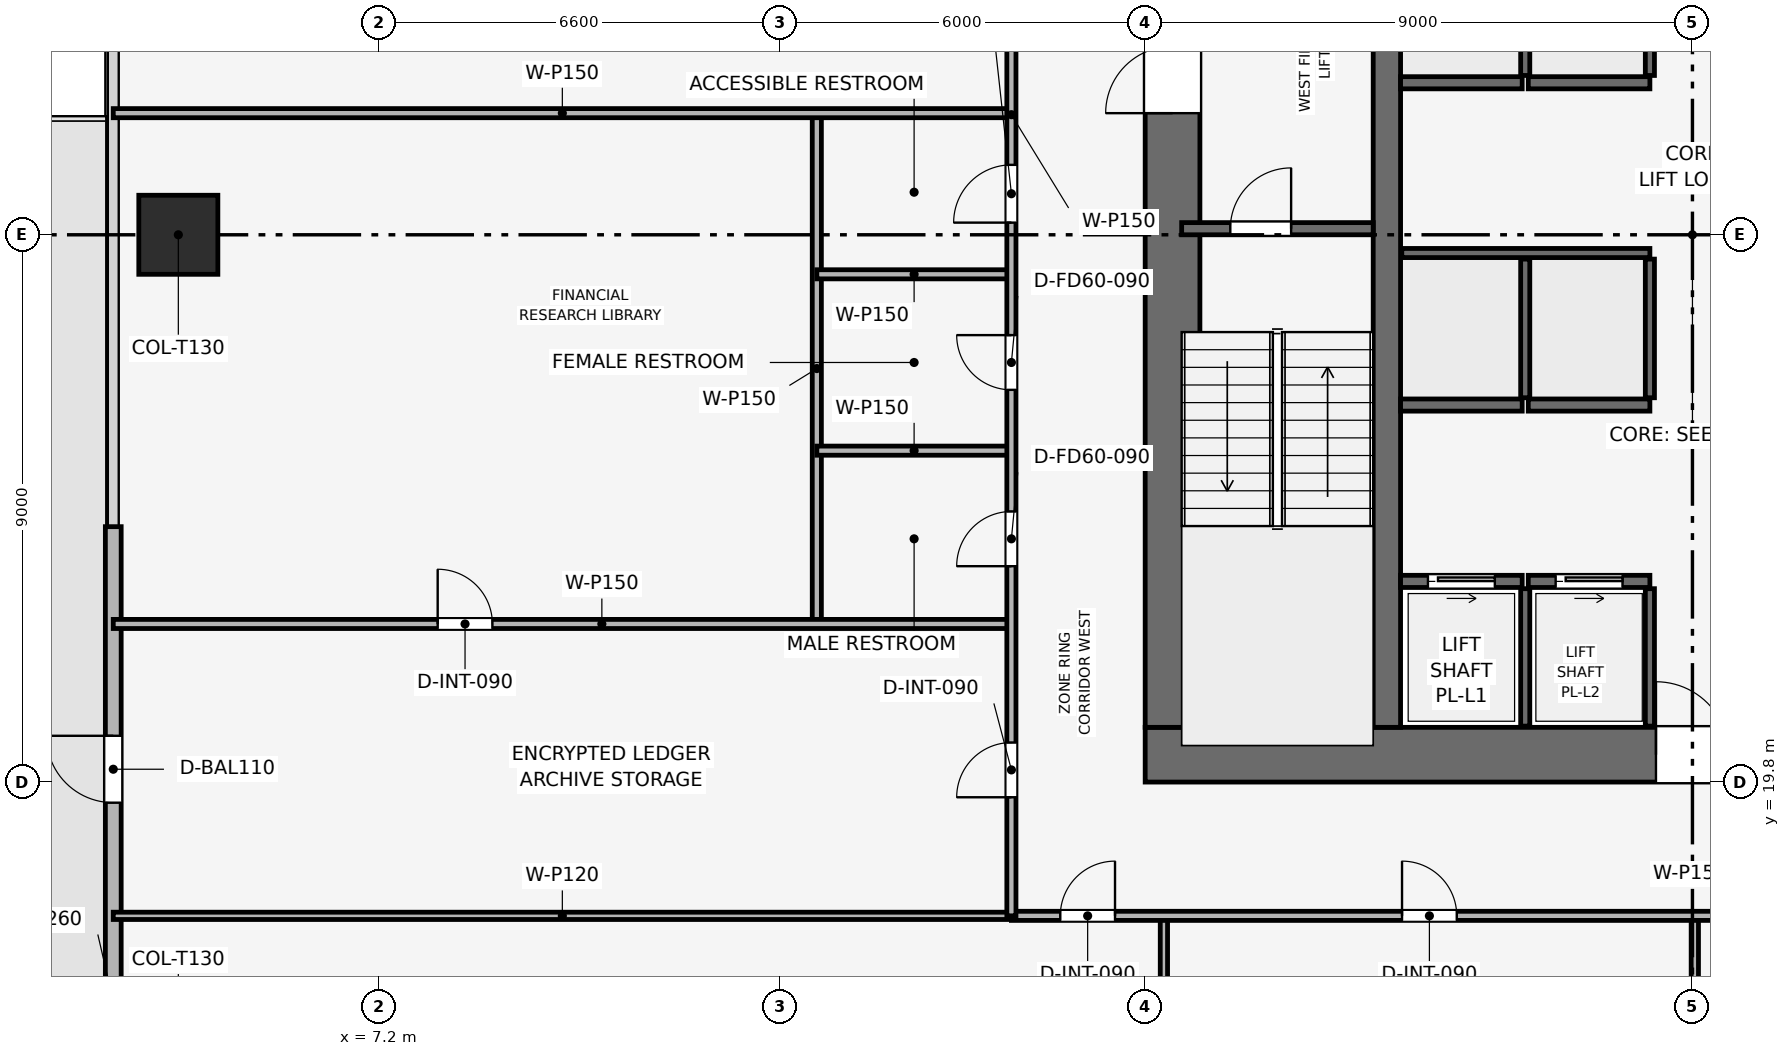
"""IFC4 building model, lengths in metres.
Left out: names, types, materials, properties, quantities, classifications, styles, units other than length and angle.
Written with IfcOpenShell. Run it as: python <this file> out.ifc"""

import sys

from ifc_helpers import new_model, si_unit, direction, frame, frame_2d, origin, origin_2d, place, context, subcontext, project, spatial, rectangle, extrude, element, fill, save


model = new_model("IFC4")
c1 = context("Model", 3, precision=1e-05, world=origin(), true_north=direction((0.0, 1.0)))
c2 = subcontext(c1, "Body", "Model", "MODEL_VIEW")
j1 = project(units=[si_unit("LENGTHUNIT", "METRE"), si_unit("PLANEANGLEUNIT", "RADIAN")], contexts=[c1])
p1 = place(None, origin())
s1 = spatial("IfcSite", under=j1, at=p1, CompositionType="ELEMENT")
p2 = place(p1, origin())
s2 = spatial("IfcBuilding", under=s1, at=p2, CompositionType="ELEMENT")
p3 = place(p2, frame((0.0, 0.0, 121.2)))
s3 = spatial("IfcBuildingStorey", under=s2, at=p3, CompositionType="ELEMENT", Elevation=121.2)
p4 = place(p3, frame((19.8, 20.25, 0.0), z_axis=(0.0, 0.0, 1.0), x_axis=(1.0, 0.0, 0.0)))
e1 = element("IfcWall", 1, at=p4, inside=s3, PredefinedType="SHEAR", context=c2, shape_type="SweptSolid", body=[
    extrude(rectangle(XDim=18.0, YDim=0.9, at=frame_2d((9.0, 0.0))), origin(), (0.0, 0.0, 1.0), 3.9),
])
p5 = place(p4, frame((8.4, 0.0, 0.0)))
e2 = element("IfcOpeningElement", 2, at=p5, cuts=e1, PredefinedType="OPENING", context=c2, shape_type="SweptSolid", body=[
    extrude(rectangle(XDim=1.2, YDim=2.2, at=frame_2d((0.6, 1.1))), frame((0.0, 0.46, 0.0), z_axis=(0.0, -1.0, 0.0), x_axis=(1.0, 0.0, 0.0)), (0.0, 0.0, 1.0), 0.92),
])
p6 = place(p3, frame((20.25, 20.7, 0.0), z_axis=(0.0, 0.0, 1.0), x_axis=(0.0, 1.0, 0.0)))
e3 = element("IfcWall", 3, at=p6, inside=s3, PredefinedType="SHEAR", context=c2, shape_type="SweptSolid", body=[
    extrude(rectangle(XDim=16.2, YDim=0.9, at=frame_2d((8.1, 0.0))), origin(), (0.0, 0.0, 1.0), 3.9),
])
p7 = place(p6, frame((10.1, 0.0, 0.0)))
e4 = element("IfcOpeningElement", 4, at=p7, cuts=e3, PredefinedType="OPENING", context=c2, shape_type="SweptSolid", body=[
    extrude(rectangle(XDim=1.1, YDim=2.15, at=frame_2d((0.55, 1.075))), frame((0.0, 0.46, 0.0), z_axis=(0.0, -1.0, 0.0), x_axis=(1.0, 0.0, 0.0)), (0.0, 0.0, 1.0), 0.92),
])
p8 = place(p3, frame((23.775, 20.7, 0.0), z_axis=(0.0, 0.0, 1.0), x_axis=(0.0, 1.0, 0.0)))
e5 = element("IfcWall", 5, at=p8, inside=s3, PredefinedType="SHEAR", context=c2, shape_type="SweptSolid", body=[
    extrude(rectangle(XDim=16.2, YDim=0.45, at=frame_2d((8.1, 0.0))), origin(), (0.0, 0.0, 1.0), 3.9),
])
p9 = place(p3, frame((3.9, 28.8, 0.003), z_axis=(0.0, 0.0, 1.0), x_axis=(1.0, 0.0, 0.0)))
e6 = element("IfcColumn", 6, at=p9, inside=s3, PredefinedType="COLUMN", context=c2, shape_type="SweptSolid", body=[
    extrude(rectangle(XDim=1.3, YDim=1.3, at=origin_2d()), origin(), (0.0, 0.0, 1.0), 3.644),
])
p10 = place(p3, frame((2.83, 9.9, 0.0), z_axis=(0.0, 0.0, 1.0), x_axis=(0.0, 1.0, 0.0)))
e7 = element("IfcWall", 7, at=p10, inside=s3, PredefinedType="SOLIDWALL", context=c2, shape_type="SweptSolid", body=[
    extrude(rectangle(XDim=14.1, YDim=0.26, at=frame_2d((7.05, 0.0))), origin(), (0.0, 0.0, 1.0), 3.65),
])
p11 = place(p10, frame((9.561, 0.0, 0.0)))
e8 = element("IfcOpeningElement", 8, at=p11, cuts=e7, PredefinedType="OPENING", context=c2, shape_type="SweptSolid", body=[
    extrude(rectangle(XDim=1.1, YDim=2.2, at=frame_2d((0.55, 1.1))), frame((0.0, 0.14, 0.0), z_axis=(0.0, -1.0, 0.0), x_axis=(1.0, 0.0, 0.0)), (0.0, 0.0, 1.0), 0.28),
])
p12 = place(p3, frame((20.4, 28.9, 0.0), z_axis=(0.0, 0.0, 1.0), x_axis=(1.0, 0.0, 0.0)))
e9 = element("IfcWall", 9, at=p12, inside=s3, PredefinedType="SHEAR", context=c2, shape_type="SweptSolid", body=[
    extrude(rectangle(XDim=3.15, YDim=0.2, at=frame_2d((1.575, 0.0))), origin(), (0.0, 0.0, 1.0), 3.65),
])
p13 = place(p12, frame((0.8, 0.0, 0.0)))
e10 = element("IfcOpeningElement", 10, at=p13, cuts=e9, PredefinedType="OPENING", context=c2, shape_type="SweptSolid", body=[
    extrude(rectangle(XDim=1.0, YDim=2.1, at=frame_2d((0.5, 1.05))), frame((0.0, 0.11, 0.0), z_axis=(0.0, -1.0, 0.0), x_axis=(1.0, 0.0, 0.0)), (0.0, 0.0, 1.0), 0.22),
])
p14 = place(p3, frame((24.0, 23.1, 0.0), z_axis=(0.0, 0.0, 1.0), x_axis=(1.0, 0.0, 0.0)))
e11 = element("IfcWall", 11, at=p14, inside=s3, PredefinedType="SHEAR", context=c2, shape_type="SweptSolid", body=[
    extrude(rectangle(XDim=2.0, YDim=0.2, at=frame_2d((1.0, 0.0))), origin(), (0.0, 0.0, 1.0), 3.65),
])
p15 = place(p14, frame((0.45, 0.0, 0.0)))
e12 = element("IfcOpeningElement", 12, at=p15, cuts=e11, PredefinedType="OPENING", context=c2, shape_type="SweptSolid", body=[
    extrude(rectangle(XDim=1.1, YDim=2.15, at=frame_2d((0.55, 1.075))), frame((0.0, 0.11, 0.0), z_axis=(0.0, -1.0, 0.0), x_axis=(1.0, 0.0, 0.0)), (0.0, 0.0, 1.0), 0.22),
])
p16 = place(p3, frame((26.1, 23.1, 0.0), z_axis=(0.0, 0.0, 1.0), x_axis=(1.0, 0.0, 0.0)))
e13 = element("IfcWall", 13, at=p16, inside=s3, PredefinedType="SHEAR", context=c2, shape_type="SweptSolid", body=[
    extrude(rectangle(XDim=2.0, YDim=0.2, at=frame_2d((1.0, 0.0))), origin(), (0.0, 0.0, 1.0), 3.65),
])
p17 = place(p16, frame((0.45, 0.0, 0.0)))
e14 = element("IfcOpeningElement", 14, at=p17, cuts=e13, PredefinedType="OPENING", context=c2, shape_type="SweptSolid", body=[
    extrude(rectangle(XDim=1.1, YDim=2.15, at=frame_2d((0.55, 1.075))), frame((0.0, 0.11, 0.0), z_axis=(0.0, -1.0, 0.0), x_axis=(1.0, 0.0, 0.0)), (0.0, 0.0, 1.0), 0.22),
])
for number, where, z_axis, x_axis in (
    (15, (24.0, 26.0, 0.0), (0.0, 0.0, 1.0), (1.0, 0.0, 0.0)),
    (16, (26.1, 26.0, 0.0), (0.0, 0.0, 1.0), (1.0, 0.0, 0.0)),
    (17, (24.0, 31.3, 0.0), (0.0, 0.0, 1.0), (1.0, 0.0, 0.0)),
    (18, (26.1, 31.3, 0.0), (0.0, 0.0, 1.0), (1.0, 0.0, 0.0)),
):
    element("IfcWall", number, at=place(p3, frame(where, z_axis=z_axis, x_axis=x_axis)), inside=s3, PredefinedType="SHEAR", context=c2, shape_type="SweptSolid", body=[
        extrude(rectangle(XDim=2.0, YDim=0.2, at=frame_2d((1.0, 0.0))), origin(), (0.0, 0.0, 1.0), 3.65),
    ])
for number, where, z_axis, x_axis in (
    (19, (26.05, 20.72, 0.0), (0.0, 0.0, 1.0), (0.0, 1.0, 0.0)),
    (20, (28.1, 20.72, 0.0), (0.0, 0.0, 1.0), (0.0, 1.0, 0.0)),
):
    element("IfcWall", number, at=place(p3, frame(where, z_axis=z_axis, x_axis=x_axis)), inside=s3, PredefinedType="SHEAR", context=c2, shape_type="SweptSolid", body=[
        extrude(rectangle(XDim=2.26, YDim=0.15, at=frame_2d((1.13, 0.0))), origin(), (0.0, 0.0, 1.0), 3.65),
    ])
p18 = place(p3, frame((24.02, 28.5, 0.0), z_axis=(0.0, 0.0, 1.0), x_axis=(1.0, 0.0, 0.0)))
e21 = element("IfcWall", 21, at=p18, inside=s3, PredefinedType="SHEAR", context=c2, shape_type="SweptSolid", body=[
    extrude(rectangle(XDim=4.08, YDim=0.15, at=frame_2d((2.04, 0.0))), origin(), (0.0, 0.0, 1.0), 3.65),
])
for number, where, z_axis, x_axis in (
    (22, (26.05, 26.12, 0.0), (0.0, 0.0, 1.0), (0.0, 1.0, 0.0)),
    (23, (28.1, 26.12, 0.0), (0.0, 0.0, 1.0), (0.0, 1.0, 0.0)),
):
    element("IfcWall", number, at=place(p3, frame(where, z_axis=z_axis, x_axis=x_axis)), inside=s3, PredefinedType="SHEAR", context=c2, shape_type="SweptSolid", body=[
        extrude(rectangle(XDim=2.28, YDim=0.15, at=frame_2d((1.14, 0.0))), origin(), (0.0, 0.0, 1.0), 3.65),
    ])
for number, where, z_axis, x_axis in (
    (24, (26.05, 31.42, 0.0), (0.0, 0.0, 1.0), (0.0, 1.0, 0.0)),
    (25, (28.1, 31.42, 0.0), (0.0, 0.0, 1.0), (0.0, 1.0, 0.0)),
):
    element("IfcWall", number, at=place(p3, frame(where, z_axis=z_axis, x_axis=x_axis)), inside=s3, PredefinedType="SHEAR", context=c2, shape_type="SweptSolid", body=[
        extrude(rectangle(XDim=2.24, YDim=0.15, at=frame_2d((1.12, 0.0))), origin(), (0.0, 0.0, 1.0), 3.65),
    ])
p19 = place(p3, frame((20.108, 2.83, 0.0), z_axis=(0.0, 0.0, 1.0), x_axis=(0.0, 1.0, 0.0)))
e26 = element("IfcWall", 26, at=p19, inside=s3, PredefinedType="PARTITIONING", context=c2, shape_type="SweptSolid", body=[
    extrude(rectangle(XDim=14.77, YDim=0.12, at=frame_2d((7.385, 0.0))), origin(), (0.0, 0.0, 1.0), 3.035),
])
p20 = place(p3, frame((28.839, 2.83, 0.0), z_axis=(0.0, 0.0, 1.0), x_axis=(0.0, 1.0, 0.0)))
e27 = element("IfcWall", 27, at=p20, inside=s3, PredefinedType="PARTITIONING", context=c2, shape_type="SweptSolid", body=[
    extrude(rectangle(XDim=14.77, YDim=0.12, at=frame_2d((7.385, 0.0))), origin(), (0.0, 0.0, 1.0), 3.135),
])
p21 = place(p3, frame((2.83, 17.6, 0.0), z_axis=(0.0, 0.0, 1.0), x_axis=(1.0, 0.0, 0.0)))
e28 = element("IfcWall", 28, at=p21, inside=s3, PredefinedType="PARTITIONING", context=c2, shape_type="SweptSolid", body=[
    extrude(rectangle(XDim=14.77, YDim=0.12, at=frame_2d((7.385, 0.0))), origin(), (0.0, 0.0, 1.0), 3.035),
])
p22 = place(p3, frame((14.4, 22.4, 0.0), z_axis=(0.0, 0.0, 1.0), x_axis=(0.0, 1.0, 0.0)))
e29 = element("IfcWall", 29, at=p22, inside=s3, PredefinedType="PARTITIONING", context=c2, shape_type="SweptSolid", body=[
    extrude(rectangle(XDim=8.4, YDim=0.15, at=frame_2d((4.2, 0.0))), origin(), (0.0, 0.0, 1.0), 3.185),
])
p23 = place(p3, frame((2.83, 22.4, 0.0), z_axis=(0.0, 0.0, 1.0), x_axis=(1.0, 0.0, 0.0)))
e30 = element("IfcWall", 30, at=p23, inside=s3, PredefinedType="PARTITIONING", context=c2, shape_type="SweptSolid", body=[
    extrude(rectangle(XDim=14.77, YDim=0.15, at=frame_2d((7.385, 0.0))), origin(), (0.0, 0.0, 1.0), 3.035),
])
p24 = place(p23, frame((5.335, 0.0, 0.0)))
e31 = element("IfcOpeningElement", 31, at=p24, cuts=e30, PredefinedType="OPENING", context=c2, shape_type="SweptSolid", body=[
    extrude(rectangle(XDim=0.9, YDim=2.1, at=frame_2d((0.45, 1.05))), frame((0.0, 0.085, 0.0), z_axis=(0.0, -1.0, 0.0), x_axis=(1.0, 0.0, 0.0)), (0.0, 0.0, 1.0), 0.17),
])
p25 = place(p3, frame((2.83, 30.8, 0.0), z_axis=(0.0, 0.0, 1.0), x_axis=(1.0, 0.0, 0.0)))
e32 = element("IfcWall", 32, at=p25, inside=s3, PredefinedType="PARTITIONING", context=c2, shape_type="SweptSolid", body=[
    extrude(rectangle(XDim=14.77, YDim=0.15, at=frame_2d((7.385, 0.0))), origin(), (0.0, 0.0, 1.0), 3.035),
])
for number, where, z_axis, x_axis in (
    (33, (14.4, 25.25, 0.0), (0.0, 0.0, 1.0), (1.0, 0.0, 0.0)),
    (34, (14.4, 28.15, 0.0), (0.0, 0.0, 1.0), (1.0, 0.0, 0.0)),
):
    element("IfcWall", number, at=place(p3, frame(where, z_axis=z_axis, x_axis=x_axis)), inside=s3, PredefinedType="PARTITIONING", context=c2, shape_type="SweptSolid", body=[
        extrude(rectangle(XDim=3.2, YDim=0.15, at=frame_2d((1.6, 0.0))), origin(), (0.0, 0.0, 1.0), 3.65),
    ])
p26 = place(p3, frame((17.6, 17.6, 0.0), z_axis=(0.0, 0.0, 1.0), x_axis=(1.0, 0.0, 0.0)))
e35 = element("IfcWall", 35, at=p26, inside=s3, PredefinedType="PARTITIONING", context=c2, shape_type="SweptSolid", body=[
    extrude(rectangle(XDim=22.4, YDim=0.15, at=frame_2d((11.2, 0.0))), origin(), (0.0, 0.0, 1.0), 3.185),
])
p27 = place(p26, frame((0.804, 0.0, 0.0)))
e36 = element("IfcOpeningElement", 36, at=p27, cuts=e35, PredefinedType="OPENING", context=c2, shape_type="SweptSolid", body=[
    extrude(rectangle(XDim=0.9, YDim=2.1, at=frame_2d((0.45, 1.05))), frame((0.0, 0.085, 0.0), z_axis=(0.0, -1.0, 0.0), x_axis=(1.0, 0.0, 0.0)), (0.0, 0.0, 1.0), 0.17),
])
p28 = place(p26, frame((6.424, 0.0, 0.0)))
e37 = element("IfcOpeningElement", 37, at=p28, cuts=e35, PredefinedType="OPENING", context=c2, shape_type="SweptSolid", body=[
    extrude(rectangle(XDim=0.9, YDim=2.1, at=frame_2d((0.45, 1.05))), frame((0.0, 0.085, 0.0), z_axis=(0.0, -1.0, 0.0), x_axis=(1.0, 0.0, 0.0)), (0.0, 0.0, 1.0), 0.17),
])
p29 = place(p26, frame((16.369, 0.0, 0.0)))
e38 = element("IfcOpeningElement", 38, at=p29, cuts=e35, PredefinedType="OPENING", context=c2, shape_type="SweptSolid", body=[
    extrude(rectangle(XDim=0.9, YDim=2.1, at=frame_2d((0.45, 1.05))), frame((0.0, 0.085, 0.0), z_axis=(0.0, -1.0, 0.0), x_axis=(1.0, 0.0, 0.0)), (0.0, 0.0, 1.0), 0.17),
])
p30 = place(p3, frame((17.6, 17.6, 0.0), z_axis=(0.0, 0.0, 1.0), x_axis=(0.0, 1.0, 0.0)))
e39 = element("IfcWall", 39, at=p30, inside=s3, PredefinedType="PARTITIONING", context=c2, shape_type="SweptSolid", body=[
    extrude(rectangle(XDim=22.4, YDim=0.15, at=frame_2d((11.2, 0.0))), origin(), (0.0, 0.0, 1.0), 3.185),
])
p31 = place(p30, frame((1.95, 0.0, 0.0)))
e40 = element("IfcOpeningElement", 40, at=p31, cuts=e39, PredefinedType="OPENING", context=c2, shape_type="SweptSolid", body=[
    extrude(rectangle(XDim=0.9, YDim=2.1, at=frame_2d((0.45, 1.05))), frame((0.0, 0.085, 0.0), z_axis=(0.0, -1.0, 0.0), x_axis=(1.0, 0.0, 0.0)), (0.0, 0.0, 1.0), 0.17),
])
p32 = place(p30, frame((5.75, 0.0, 0.0)))
e41 = element("IfcOpeningElement", 41, at=p32, cuts=e39, PredefinedType="OPENING", context=c2, shape_type="SweptSolid", body=[
    extrude(rectangle(XDim=0.9, YDim=2.1, at=frame_2d((0.45, 1.05))), frame((0.0, 0.085, 0.0), z_axis=(0.0, -1.0, 0.0), x_axis=(1.0, 0.0, 0.0)), (0.0, 0.0, 1.0), 0.17),
])
p33 = place(p30, frame((8.65, 0.0, 0.0)))
e42 = element("IfcOpeningElement", 42, at=p33, cuts=e39, PredefinedType="OPENING", context=c2, shape_type="SweptSolid", body=[
    extrude(rectangle(XDim=0.9, YDim=2.1, at=frame_2d((0.45, 1.05))), frame((0.0, 0.085, 0.0), z_axis=(0.0, -1.0, 0.0), x_axis=(1.0, 0.0, 0.0)), (0.0, 0.0, 1.0), 0.17),
])
p34 = place(p30, frame((11.4, 0.0, 0.0)))
e43 = element("IfcOpeningElement", 43, at=p34, cuts=e39, PredefinedType="OPENING", context=c2, shape_type="SweptSolid", body=[
    extrude(rectangle(XDim=0.95, YDim=2.1, at=frame_2d((0.475, 1.05))), frame((0.0, 0.085, 0.0), z_axis=(0.0, -1.0, 0.0), x_axis=(1.0, 0.0, 0.0)), (0.0, 0.0, 1.0), 0.17),
])
p35 = place(p30, frame((17.35, 0.0, 0.0)))
e44 = element("IfcOpeningElement", 44, at=p35, cuts=e39, PredefinedType="OPENING", context=c2, shape_type="SweptSolid", body=[
    extrude(rectangle(XDim=0.9, YDim=2.1, at=frame_2d((0.45, 1.05))), frame((0.0, 0.085, 0.0), z_axis=(0.0, -1.0, 0.0), x_axis=(1.0, 0.0, 0.0)), (0.0, 0.0, 1.0), 0.17),
])
p36 = place(p11, origin())
e45 = element("IfcDoor", 45, at=p36, inside=s3, OperationType="SINGLE_SWING_RIGHT", PredefinedType="DOOR", context=c2, shape_type="SweptSolid", body=[
    extrude(rectangle(XDim=1.1, YDim=2.2, at=frame_2d((0.55, 1.1))), frame((0.0, 0.025, 0.0), z_axis=(0.0, -1.0, 0.0), x_axis=(1.0, 0.0, 0.0)), (0.0, 0.0, 1.0), 0.05),
])
fill(e8, e45)
p37 = place(p13, origin())
e46 = element("IfcDoor", 46, at=p37, inside=s3, OperationType="SINGLE_SWING_RIGHT", PredefinedType="DOOR", context=c2, shape_type="SweptSolid", body=[
    extrude(rectangle(XDim=1.0, YDim=2.1, at=frame_2d((0.5, 1.05))), frame((0.0, 0.025, 0.0), z_axis=(0.0, -1.0, 0.0), x_axis=(1.0, 0.0, 0.0)), (0.0, 0.0, 1.0), 0.05),
])
fill(e10, e46)
p38 = place(p15, origin())
e47 = element("IfcDoor", 47, at=p38, inside=s3, OperationType="SLIDING_TO_RIGHT", PredefinedType="DOOR", context=c2, shape_type="SweptSolid", body=[
    extrude(rectangle(XDim=1.1, YDim=2.15, at=frame_2d((0.55, 1.075))), frame((0.0, 0.025, 0.0), z_axis=(0.0, -1.0, 0.0), x_axis=(1.0, 0.0, 0.0)), (0.0, 0.0, 1.0), 0.05),
])
fill(e12, e47)
p39 = place(p17, origin())
e48 = element("IfcDoor", 48, at=p39, inside=s3, OperationType="SLIDING_TO_RIGHT", PredefinedType="DOOR", context=c2, shape_type="SweptSolid", body=[
    extrude(rectangle(XDim=1.1, YDim=2.15, at=frame_2d((0.55, 1.075))), frame((0.0, 0.025, 0.0), z_axis=(0.0, -1.0, 0.0), x_axis=(1.0, 0.0, 0.0)), (0.0, 0.0, 1.0), 0.05),
])
fill(e14, e48)
p40 = place(p24, origin())
e49 = element("IfcDoor", 49, at=p40, inside=s3, OperationType="SINGLE_SWING_LEFT", PredefinedType="DOOR", context=c2, shape_type="SweptSolid", body=[
    extrude(rectangle(XDim=0.9, YDim=2.1, at=frame_2d((0.45, 1.05))), frame((0.0, 0.025, 0.0), z_axis=(0.0, -1.0, 0.0), x_axis=(1.0, 0.0, 0.0)), (0.0, 0.0, 1.0), 0.05),
])
fill(e31, e49)
p41 = place(p27, origin())
e50 = element("IfcDoor", 50, at=p41, inside=s3, OperationType="SINGLE_SWING_RIGHT", PredefinedType="DOOR", context=c2, shape_type="SweptSolid", body=[
    extrude(rectangle(XDim=0.9, YDim=2.1, at=frame_2d((0.45, 1.05))), frame((0.0, 0.025, 0.0), z_axis=(0.0, -1.0, 0.0), x_axis=(1.0, 0.0, 0.0)), (0.0, 0.0, 1.0), 0.05),
])
fill(e36, e50)
p42 = place(p28, origin())
e51 = element("IfcDoor", 51, at=p42, inside=s3, OperationType="SINGLE_SWING_LEFT", PredefinedType="DOOR", context=c2, shape_type="SweptSolid", body=[
    extrude(rectangle(XDim=0.9, YDim=2.1, at=frame_2d((0.45, 1.05))), frame((0.0, 0.025, 0.0), z_axis=(0.0, -1.0, 0.0), x_axis=(1.0, 0.0, 0.0)), (0.0, 0.0, 1.0), 0.05),
])
fill(e37, e51)
p43 = place(p31, origin())
e52 = element("IfcDoor", 52, at=p43, inside=s3, OperationType="SINGLE_SWING_LEFT", PredefinedType="DOOR", context=c2, shape_type="SweptSolid", body=[
    extrude(rectangle(XDim=0.9, YDim=2.1, at=frame_2d((0.45, 1.05))), frame((0.0, 0.025, 0.0), z_axis=(0.0, -1.0, 0.0), x_axis=(1.0, 0.0, 0.0)), (0.0, 0.0, 1.0), 0.05),
])
fill(e40, e52)
p44 = place(p32, origin())
e53 = element("IfcDoor", 53, at=p44, inside=s3, OperationType="SINGLE_SWING_LEFT", PredefinedType="DOOR", context=c2, shape_type="SweptSolid", body=[
    extrude(rectangle(XDim=0.9, YDim=2.1, at=frame_2d((0.45, 1.05))), frame((0.0, 0.025, 0.0), z_axis=(0.0, -1.0, 0.0), x_axis=(1.0, 0.0, 0.0)), (0.0, 0.0, 1.0), 0.05),
])
fill(e41, e53)
p45 = place(p33, origin())
e54 = element("IfcDoor", 54, at=p45, inside=s3, OperationType="SINGLE_SWING_RIGHT", PredefinedType="DOOR", context=c2, shape_type="SweptSolid", body=[
    extrude(rectangle(XDim=0.9, YDim=2.1, at=frame_2d((0.45, 1.05))), frame((0.0, 0.025, 0.0), z_axis=(0.0, -1.0, 0.0), x_axis=(1.0, 0.0, 0.0)), (0.0, 0.0, 1.0), 0.05),
])
fill(e42, e54)
p46 = place(p34, origin())
e55 = element("IfcDoor", 55, at=p46, inside=s3, OperationType="SINGLE_SWING_LEFT", PredefinedType="DOOR", context=c2, shape_type="SweptSolid", body=[
    extrude(rectangle(XDim=0.95, YDim=2.1, at=frame_2d((0.475, 1.05))), frame((0.0, 0.025, 0.0), z_axis=(0.0, -1.0, 0.0), x_axis=(1.0, 0.0, 0.0)), (0.0, 0.0, 1.0), 0.05),
])
fill(e43, e55)
p47 = place(p7, origin())
e56 = element("IfcDoor", 56, at=p47, inside=s3, OperationType="SINGLE_SWING_LEFT", PredefinedType="DOOR", context=c2, shape_type="SweptSolid", body=[
    extrude(rectangle(XDim=1.1, YDim=2.15, at=frame_2d((0.55, 1.075))), frame((0.0, 0.025, 0.0), z_axis=(0.0, -1.0, 0.0), x_axis=(1.0, 0.0, 0.0)), (0.0, 0.0, 1.0), 0.05),
])
fill(e4, e56)
p48 = place(p5, origin())
e57 = element("IfcDoor", 57, at=p48, inside=s3, OperationType="SINGLE_SWING_LEFT", PredefinedType="DOOR", context=c2, shape_type="SweptSolid", body=[
    extrude(rectangle(XDim=1.2, YDim=2.2, at=frame_2d((0.6, 1.1))), frame((0.0, 0.025, 0.0), z_axis=(0.0, -1.0, 0.0), x_axis=(1.0, 0.0, 0.0)), (0.0, 0.0, 1.0), 0.05),
])
fill(e2, e57)
save(model, sys.argv[1])
